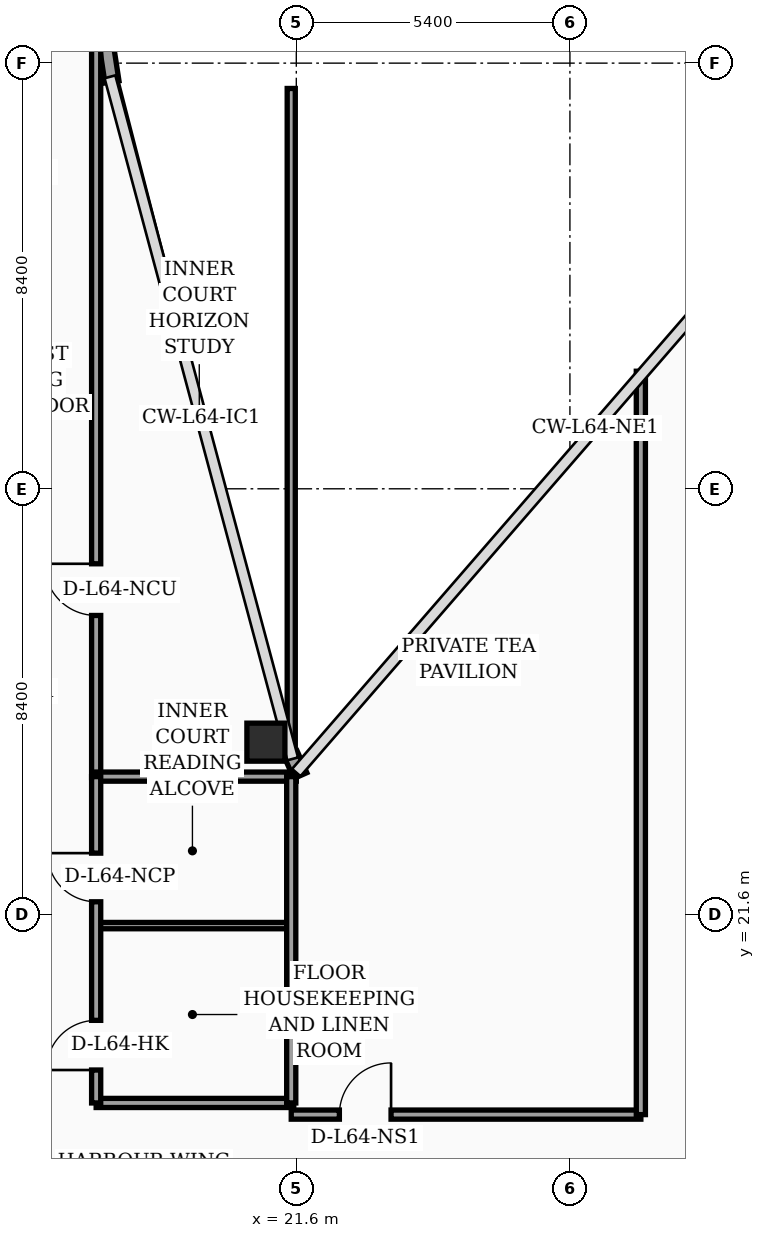
"""IFC4 building model, lengths in metres.
Left out: names, types, materials, properties, quantities, classifications, styles, units other than length and angle.
Written with IfcOpenShell. Run it as: python <this file> out.ifc"""

import sys

from ifc_helpers import new_model, si_unit, direction, frame, frame_2d, origin, origin_2d, place, context, subcontext, project, spatial, rectangle, hollow_rectangle, extrude, element, fill, save


model = new_model("IFC4")
c1 = context("Model", 3, precision=1e-05, world=origin(), true_north=direction((0.0, 1.0)))
c2 = subcontext(c1, "Body", "Model", "MODEL_VIEW")
j1 = project(units=[si_unit("LENGTHUNIT", "METRE"), si_unit("PLANEANGLEUNIT", "RADIAN")], contexts=[c1])
p1 = place(None, origin())
s1 = spatial("IfcSite", under=j1, at=p1, CompositionType="ELEMENT")
p2 = place(p1, origin())
s2 = spatial("IfcBuilding", under=s1, at=p2, CompositionType="ELEMENT")
p3 = place(p2, frame((0.0, 0.0, 259.0)))
s3 = spatial("IfcBuildingStorey", under=s2, at=p3, CompositionType="ELEMENT", Elevation=259.0)
p4 = place(p3, frame((21.0, 25.0, 0.0), z_axis=(0.0, 0.0, 1.0), x_axis=(1.0, 0.0, 0.0)))
e1 = element("IfcColumn", 1, at=p4, inside=s3, PredefinedType="COLUMN", context=c2, shape_type="SweptSolid", body=[
    extrude(hollow_rectangle(XDim=0.75, YDim=0.75, WallThickness=0.032, at=origin_2d()), origin(), (0.0, 0.0, 1.0), 4.05),
])
p5 = place(p3, frame((21.68, 24.34, 0.0), z_axis=(0.0, 0.0, 1.0), x_axis=(-0.40758134973, 0.913168901875, 0.0)))
e2 = element("IfcWall", 2, at=p5, inside=s3, PredefinedType="SOLIDWALL", context=c2, shape_type="SweptSolid", body=[
    extrude(rectangle(XDim=0.471, YDim=0.28, at=frame_2d((0.235, 0.0))), origin(), (0.0, 0.0, 1.0), 4.05),
])
p6 = place(p3, frame((17.962, 38.03, 0.0), z_axis=(0.0, 0.0, 1.0), x_axis=(-0.15141125477, 0.988470855377, 0.0)))
e3 = element("IfcWall", 3, at=p6, inside=s3, PredefinedType="SOLIDWALL", context=c2, shape_type="SweptSolid", body=[
    extrude(rectangle(XDim=0.739, YDim=0.28, at=frame_2d((0.369, 0.0))), origin(), (0.0, 0.0, 1.0), 4.05),
])
p7 = place(p3, frame((17.65, 24.3, 0.0), z_axis=(0.0, 0.0, 1.0), x_axis=(0.0, 1.0, 0.0)))
e4 = element("IfcWall", 4, at=p7, inside=s3, PredefinedType="PARTITIONING", context=c2, shape_type="SweptSolid", body=[
    extrude(rectangle(XDim=18.15, YDim=0.18, at=frame_2d((9.075, 0.0))), origin(), (0.0, 0.0, 1.0), 3.5),
])
p8 = place(p7, frame((3.2, 0.0, 0.0)))
e5 = element("IfcOpeningElement", 5, at=p8, cuts=e4, PredefinedType="OPENING", context=c2, shape_type="SweptSolid", body=[
    extrude(rectangle(XDim=1.02, YDim=2.2, at=frame_2d((0.51, 1.1))), frame((0.0, 0.1, 0.0), z_axis=(0.0, -1.0, 0.0), x_axis=(1.0, 0.0, 0.0)), (0.0, 0.0, 1.0), 0.2),
])
p9 = place(p3, frame((17.65, 17.88, 0.0), z_axis=(0.0, 0.0, 1.0), x_axis=(1.0, 0.0, 0.0)))
e6 = element("IfcWall", 6, at=p9, inside=s3, PredefinedType="PARTITIONING", context=c2, shape_type="SweptSolid", body=[
    extrude(rectangle(XDim=3.9, YDim=0.18, at=frame_2d((1.95, 0.0))), origin(), (0.0, 0.0, 1.0), 4.05),
])
p10 = place(p3, frame((17.65, 21.38, 0.0), z_axis=(0.0, 0.0, 1.0), x_axis=(1.0, 0.0, 0.0)))
e7 = element("IfcWall", 7, at=p10, inside=s3, PredefinedType="PARTITIONING", context=c2, shape_type="SweptSolid", body=[
    extrude(rectangle(XDim=3.9, YDim=0.125, at=frame_2d((1.95, 0.0))), origin(), (0.0, 0.0, 1.0), 4.05),
])
p11 = place(p3, frame((17.65, 24.32, 0.0), z_axis=(0.0, 0.0, 1.0), x_axis=(1.0, 0.0, 0.0)))
e8 = element("IfcWall", 8, at=p11, inside=s3, PredefinedType="PARTITIONING", context=c2, shape_type="SweptSolid", body=[
    extrude(rectangle(XDim=3.95, YDim=0.18, at=frame_2d((1.975, 0.0))), origin(), (0.0, 0.0, 1.0), 4.05),
])
p12 = place(p3, frame((21.5, 17.88, 0.0), z_axis=(0.0, 0.0, 1.0), x_axis=(0.0, 1.0, 0.0)))
e9 = element("IfcWall", 9, at=p12, inside=s3, PredefinedType="PARTITIONING", context=c2, shape_type="SweptSolid", body=[
    extrude(rectangle(XDim=6.44, YDim=0.18, at=frame_2d((3.22, 0.0))), origin(), (0.0, 0.0, 1.0), 4.05),
])
p13 = place(p3, frame((17.65, 17.88, 0.0), z_axis=(0.0, 0.0, 1.0), x_axis=(0.0, 1.0, 0.0)))
e10 = element("IfcWall", 10, at=p13, inside=s3, PredefinedType="PARTITIONING", context=c2, shape_type="SweptSolid", body=[
    extrude(rectangle(XDim=6.44, YDim=0.18, at=frame_2d((3.22, 0.0))), origin(), (0.0, 0.0, 1.0), 4.05),
])
p14 = place(p13, frame((0.65, 0.0, 0.0)))
e11 = element("IfcOpeningElement", 11, at=p14, cuts=e10, PredefinedType="OPENING", context=c2, shape_type="SweptSolid", body=[
    extrude(rectangle(XDim=0.98, YDim=2.15, at=frame_2d((0.49, 1.075))), frame((0.0, 0.1, 0.0), z_axis=(0.0, -1.0, 0.0), x_axis=(1.0, 0.0, 0.0)), (0.0, 0.0, 1.0), 0.2),
])
p15 = place(p13, frame((3.97, 0.0, 0.0)))
e12 = element("IfcOpeningElement", 12, at=p15, cuts=e10, PredefinedType="OPENING", context=c2, shape_type="SweptSolid", body=[
    extrude(rectangle(XDim=0.96, YDim=2.2, at=frame_2d((0.48, 1.1))), frame((0.0, 0.1, 0.0), z_axis=(0.0, -1.0, 0.0), x_axis=(1.0, 0.0, 0.0)), (0.0, 0.0, 1.0), 0.2),
])
p16 = place(p3, frame((21.5, 24.85, 0.0), z_axis=(0.0, 0.0, 1.0), x_axis=(0.0, 1.0, 0.0)))
e13 = element("IfcWall", 13, at=p16, inside=s3, PredefinedType="PARTITIONING", context=c2, shape_type="SweptSolid", body=[
    extrude(rectangle(XDim=13.05, YDim=0.16, at=frame_2d((6.525, 0.0))), origin(), (0.0, 0.0, 1.0), 2.35),
])
p17 = place(p3, frame((21.5, 17.65, 0.0), z_axis=(0.0, 0.0, 1.0), x_axis=(1.0, 0.0, 0.0)))
e14 = element("IfcWall", 14, at=p17, inside=s3, PredefinedType="PARTITIONING", context=c2, shape_type="SweptSolid", body=[
    extrude(rectangle(XDim=6.9, YDim=0.18, at=frame_2d((3.45, 0.0))), origin(), (0.0, 0.0, 1.0), 2.35),
])
p18 = place(p17, frame((0.95, 0.0, 0.0)))
e15 = element("IfcOpeningElement", 15, at=p18, cuts=e14, PredefinedType="OPENING", context=c2, shape_type="SweptSolid", body=[
    extrude(rectangle(XDim=1.02, YDim=2.2, at=frame_2d((0.51, 1.1))), frame((0.0, 0.1, 0.0), z_axis=(0.0, -1.0, 0.0), x_axis=(1.0, 0.0, 0.0)), (0.0, 0.0, 1.0), 0.2),
])
p19 = place(p3, frame((28.4, 17.65, 0.0), z_axis=(0.0, 0.0, 1.0), x_axis=(0.0, 1.0, 0.0)))
e16 = element("IfcWall", 16, at=p19, inside=s3, PredefinedType="PARTITIONING", context=c2, shape_type="SweptSolid", body=[
    extrude(rectangle(XDim=14.67, YDim=0.18, at=frame_2d((7.335, 0.0))), origin(), (0.0, 0.0, 1.0), 2.35),
])
p20 = place(p8, origin())
e17 = element("IfcDoor", 17, at=p20, inside=s3, OperationType="SINGLE_SWING_RIGHT", PredefinedType="DOOR", context=c2, shape_type="SweptSolid", body=[
    extrude(rectangle(XDim=1.02, YDim=2.2, at=frame_2d((0.51, 1.1))), frame((0.0, 0.025, 0.0), z_axis=(0.0, -1.0, 0.0), x_axis=(1.0, 0.0, 0.0)), (0.0, 0.0, 1.0), 0.05),
])
fill(e5, e17)
p21 = place(p14, origin())
e18 = element("IfcDoor", 18, at=p21, inside=s3, OperationType="SINGLE_SWING_LEFT", PredefinedType="DOOR", context=c2, shape_type="SweptSolid", body=[
    extrude(rectangle(XDim=0.98, YDim=2.15, at=frame_2d((0.49, 1.075))), frame((0.0, 0.025, 0.0), z_axis=(0.0, -1.0, 0.0), x_axis=(1.0, 0.0, 0.0)), (0.0, 0.0, 1.0), 0.05),
])
fill(e11, e18)
p22 = place(p15, origin())
e19 = element("IfcDoor", 19, at=p22, inside=s3, OperationType="SINGLE_SWING_RIGHT", PredefinedType="DOOR", context=c2, shape_type="SweptSolid", body=[
    extrude(rectangle(XDim=0.96, YDim=2.2, at=frame_2d((0.48, 1.1))), frame((0.0, 0.025, 0.0), z_axis=(0.0, -1.0, 0.0), x_axis=(1.0, 0.0, 0.0)), (0.0, 0.0, 1.0), 0.05),
])
fill(e12, e19)
p23 = place(p18, origin())
e20 = element("IfcDoor", 20, at=p23, inside=s3, OperationType="SINGLE_SWING_RIGHT", PredefinedType="DOOR", context=c2, shape_type="SweptSolid", body=[
    extrude(rectangle(XDim=1.02, YDim=2.2, at=frame_2d((0.51, 1.1))), frame((0.0, 0.025, 0.0), z_axis=(0.0, -1.0, 0.0), x_axis=(1.0, 0.0, 0.0)), (0.0, 0.0, 1.0), 0.05),
])
fill(e15, e20)
save(model, sys.argv[1])
